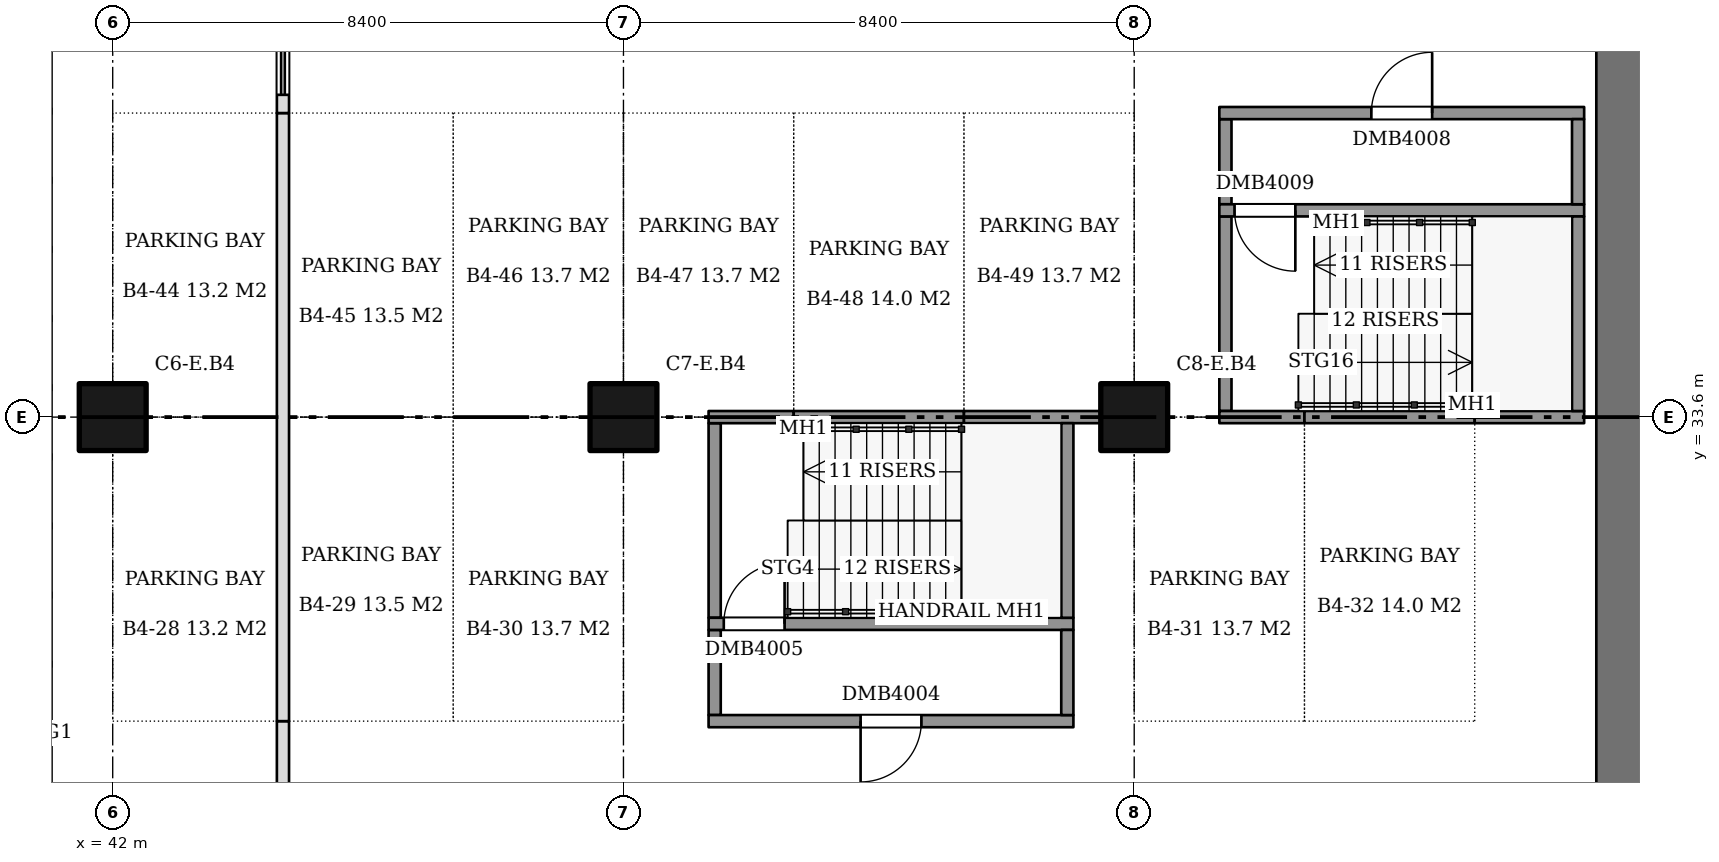
"""IFC4 building model, lengths in metres.
Left out: names, types, materials, properties, quantities, classifications, styles, units other than length and angle.
Written with IfcOpenShell. Run it as: python <this file> out.ifc"""

import sys

from ifc_helpers import new_model, si_unit, direction, frame, frame_2d, origin, origin_2d, place, context, subcontext, project, spatial, rectangle, extrude, element, fill, save


model = new_model("IFC4")
c1 = context("Model", 3, precision=1e-05, world=origin(), true_north=direction((0.0, 1.0)))
c2 = subcontext(c1, "Body", "Model", "MODEL_VIEW")
j1 = project(units=[si_unit("LENGTHUNIT", "METRE"), si_unit("PLANEANGLEUNIT", "RADIAN")], contexts=[c1])
p1 = place(None, origin())
s1 = spatial("IfcSite", under=j1, at=p1, CompositionType="ELEMENT")
p2 = place(p1, origin())
s2 = spatial("IfcBuilding", under=s1, at=p2, CompositionType="ELEMENT")
p3 = place(p2, frame((0.0, 0.0, -16.0)))
s3 = spatial("IfcBuildingStorey", under=s2, at=p3, CompositionType="ELEMENT", Elevation=-16.0)
p4 = place(p3, frame((66.8, 0.4, 0.0), z_axis=(0.0, 0.0, 1.0), x_axis=(0.0, 1.0, 0.0)))
e1 = element("IfcWall", 1, at=p4, inside=s3, PredefinedType="SOLIDWALL", context=c2, shape_type="SweptSolid", body=[
    extrude(rectangle(XDim=58.0, YDim=0.8, at=frame_2d((29.0, 0.0))), origin(), (0.0, 0.0, 1.0), 3.7),
])
for number, where, z_axis, x_axis in (
    (2, (42.0, 33.6, 0.0), (0.0, 0.0, 1.0), (1.0, 0.0, 0.0)),
    (3, (50.4, 33.6, 0.0), (0.0, 0.0, 1.0), (1.0, 0.0, 0.0)),
    (4, (58.8, 33.6, 0.0), (0.0, 0.0, 1.0), (1.0, 0.0, 0.0)),
):
    element("IfcColumn", number, at=place(p3, frame(where, z_axis=z_axis, x_axis=x_axis)), inside=s3, PredefinedType="COLUMN", context=c2, shape_type="SweptSolid", body=[
        extrude(rectangle(XDim=1.1, YDim=1.1, at=origin_2d()), origin(), (0.0, 0.0, 1.0), 3.7),
    ])
p5 = place(p3, frame((51.9, 28.7, 0.0), z_axis=(0.0, 0.0, 1.0), x_axis=(0.0, 1.0, 0.0)))
e5 = element("IfcWall", 5, at=p5, inside=s3, PredefinedType="SOLIDWALL", context=c2, shape_type="SweptSolid", body=[
    extrude(rectangle(XDim=1.4, YDim=0.2, at=frame_2d((0.7, 0.0))), origin(), (0.0, 0.0, 1.0), 3.7),
])
p6 = place(p3, frame((51.8, 28.6, 0.0), z_axis=(0.0, 0.0, 1.0), x_axis=(1.0, 0.0, 0.0)))
e6 = element("IfcWall", 6, at=p6, inside=s3, PredefinedType="SOLIDWALL", context=c2, shape_type="SweptSolid", body=[
    extrude(rectangle(XDim=6.0, YDim=0.2, at=frame_2d((3.0, 0.0))), origin(), (0.0, 0.0, 1.0), 3.7),
])
p7 = place(p6, frame((2.5, 0.0, 0.0)))
e7 = element("IfcOpeningElement", 7, at=p7, cuts=e6, PredefinedType="OPENING", context=c2, shape_type="SweptSolid", body=[
    extrude(rectangle(XDim=1.0, YDim=2.1, at=frame_2d((0.5, 1.05))), frame((0.0, 0.11, 0.0), z_axis=(0.0, -1.0, 0.0), x_axis=(1.0, 0.0, 0.0)), (0.0, 0.0, 1.0), 0.22),
])
p8 = place(p3, frame((51.9, 30.3, 0.0), z_axis=(0.0, 0.0, 1.0), x_axis=(0.0, 1.0, 0.0)))
e8 = element("IfcWall", 8, at=p8, inside=s3, PredefinedType="SOLIDWALL", context=c2, shape_type="SweptSolid", body=[
    extrude(rectangle(XDim=3.2, YDim=0.2, at=frame_2d((1.6, 0.0))), origin(), (0.0, 0.0, 1.0), 3.7),
])
p9 = place(p3, frame((51.8, 30.2, 0.0), z_axis=(0.0, 0.0, 1.0), x_axis=(1.0, 0.0, 0.0)))
e9 = element("IfcWall", 9, at=p9, inside=s3, PredefinedType="SOLIDWALL", context=c2, shape_type="SweptSolid", body=[
    extrude(rectangle(XDim=6.0, YDim=0.2, at=frame_2d((3.0, 0.0))), origin(), (0.0, 0.0, 1.0), 3.7),
])
p10 = place(p9, frame((0.25, 0.0, 0.0)))
e10 = element("IfcOpeningElement", 10, at=p10, cuts=e9, PredefinedType="OPENING", context=c2, shape_type="SweptSolid", body=[
    extrude(rectangle(XDim=1.0, YDim=2.1, at=frame_2d((0.5, 1.05))), frame((0.0, 0.11, 0.0), z_axis=(0.0, -1.0, 0.0), x_axis=(1.0, 0.0, 0.0)), (0.0, 0.0, 1.0), 0.22),
])
p11 = place(p3, frame((51.8, 33.6, 0.0), z_axis=(0.0, 0.0, 1.0), x_axis=(1.0, 0.0, 0.0)))
e11 = element("IfcWall", 11, at=p11, inside=s3, PredefinedType="SOLIDWALL", context=c2, shape_type="SweptSolid", body=[
    extrude(rectangle(XDim=1.4, YDim=0.2, at=frame_2d((0.7, 0.0))), origin(), (0.0, 0.0, 1.0), 3.7),
])
p12 = place(p3, frame((53.2, 33.6, 0.0), z_axis=(0.0, 0.0, 1.0), x_axis=(1.0, 0.0, 0.0)))
e12 = element("IfcWall", 12, at=p12, inside=s3, PredefinedType="SOLIDWALL", context=c2, shape_type="SweptSolid", body=[
    extrude(rectangle(XDim=2.8, YDim=0.2, at=frame_2d((1.4, 0.0))), origin(), (0.0, 0.0, 1.0), 3.7),
])
p13 = place(p3, frame((56.0, 33.6, 0.0), z_axis=(0.0, 0.0, 1.0), x_axis=(1.0, 0.0, 0.0)))
e13 = element("IfcWall", 13, at=p13, inside=s3, PredefinedType="SOLIDWALL", context=c2, shape_type="SweptSolid", body=[
    extrude(rectangle(XDim=2.25, YDim=0.2, at=frame_2d((1.125, 0.0))), origin(), (0.0, 0.0, 1.0), 3.7),
])
p14 = place(p3, frame((57.7, 28.7, 0.0), z_axis=(0.0, 0.0, 1.0), x_axis=(0.0, 1.0, 0.0)))
e14 = element("IfcWall", 14, at=p14, inside=s3, PredefinedType="SOLIDWALL", context=c2, shape_type="SweptSolid", body=[
    extrude(rectangle(XDim=1.4, YDim=0.2, at=frame_2d((0.7, 0.0))), origin(), (0.0, 0.0, 1.0), 3.7),
])
for number, where, z_axis, x_axis in (
    (15, (57.7, 30.3, 0.0), (0.0, 0.0, 1.0), (0.0, 1.0, 0.0)),
    (16, (60.3, 33.7, 0.0), (0.0, 0.0, 1.0), (0.0, 1.0, 0.0)),
):
    element("IfcWall", number, at=place(p3, frame(where, z_axis=z_axis, x_axis=x_axis)), inside=s3, PredefinedType="SOLIDWALL", context=c2, shape_type="SweptSolid", body=[
        extrude(rectangle(XDim=3.2, YDim=0.2, at=frame_2d((1.6, 0.0))), origin(), (0.0, 0.0, 1.0), 3.7),
    ])
p15 = place(p3, frame((60.2, 33.6, 0.0), z_axis=(0.0, 0.0, 1.0), x_axis=(1.0, 0.0, 0.0)))
e17 = element("IfcWall", 17, at=p15, inside=s3, PredefinedType="SOLIDWALL", context=c2, shape_type="SweptSolid", body=[
    extrude(rectangle(XDim=1.4, YDim=0.2, at=frame_2d((0.7, 0.0))), origin(), (0.0, 0.0, 1.0), 3.7),
])
p16 = place(p3, frame((60.3, 37.1, 0.0), z_axis=(0.0, 0.0, 1.0), x_axis=(0.0, 1.0, 0.0)))
e18 = element("IfcWall", 18, at=p16, inside=s3, PredefinedType="SOLIDWALL", context=c2, shape_type="SweptSolid", body=[
    extrude(rectangle(XDim=1.4, YDim=0.2, at=frame_2d((0.7, 0.0))), origin(), (0.0, 0.0, 1.0), 3.7),
])
p17 = place(p3, frame((60.2, 37.0, 0.0), z_axis=(0.0, 0.0, 1.0), x_axis=(1.0, 0.0, 0.0)))
e19 = element("IfcWall", 19, at=p17, inside=s3, PredefinedType="SOLIDWALL", context=c2, shape_type="SweptSolid", body=[
    extrude(rectangle(XDim=6.0, YDim=0.2, at=frame_2d((3.0, 0.0))), origin(), (0.0, 0.0, 1.0), 3.7),
])
p18 = place(p17, frame((0.25, 0.0, 0.0)))
e20 = element("IfcOpeningElement", 20, at=p18, cuts=e19, PredefinedType="OPENING", context=c2, shape_type="SweptSolid", body=[
    extrude(rectangle(XDim=1.0, YDim=2.1, at=frame_2d((0.5, 1.05))), frame((0.0, 0.11, 0.0), z_axis=(0.0, -1.0, 0.0), x_axis=(1.0, 0.0, 0.0)), (0.0, 0.0, 1.0), 0.22),
])
p19 = place(p3, frame((60.2, 38.6, 0.0), z_axis=(0.0, 0.0, 1.0), x_axis=(1.0, 0.0, 0.0)))
e21 = element("IfcWall", 21, at=p19, inside=s3, PredefinedType="SOLIDWALL", context=c2, shape_type="SweptSolid", body=[
    extrude(rectangle(XDim=6.0, YDim=0.2, at=frame_2d((3.0, 0.0))), origin(), (0.0, 0.0, 1.0), 3.7),
])
p20 = place(p19, frame((2.5, 0.0, 0.0)))
e22 = element("IfcOpeningElement", 22, at=p20, cuts=e21, PredefinedType="OPENING", context=c2, shape_type="SweptSolid", body=[
    extrude(rectangle(XDim=1.0, YDim=2.1, at=frame_2d((0.5, 1.05))), frame((0.0, 0.11, 0.0), z_axis=(0.0, -1.0, 0.0), x_axis=(1.0, 0.0, 0.0)), (0.0, 0.0, 1.0), 0.22),
])
p21 = place(p3, frame((61.6, 33.6, 0.0), z_axis=(0.0, 0.0, 1.0), x_axis=(1.0, 0.0, 0.0)))
e23 = element("IfcWall", 23, at=p21, inside=s3, PredefinedType="SOLIDWALL", context=c2, shape_type="SweptSolid", body=[
    extrude(rectangle(XDim=2.8, YDim=0.2, at=frame_2d((1.4, 0.0))), origin(), (0.0, 0.0, 1.0), 3.7),
])
p22 = place(p3, frame((64.4, 33.6, 0.0), z_axis=(0.0, 0.0, 1.0), x_axis=(1.0, 0.0, 0.0)))
e24 = element("IfcWall", 24, at=p22, inside=s3, PredefinedType="SOLIDWALL", context=c2, shape_type="SweptSolid", body=[
    extrude(rectangle(XDim=1.8, YDim=0.2, at=frame_2d((0.9, 0.0))), origin(), (0.0, 0.0, 1.0), 3.7),
])
p23 = place(p3, frame((66.1, 33.7, 0.0), z_axis=(0.0, 0.0, 1.0), x_axis=(0.0, 1.0, 0.0)))
e25 = element("IfcWall", 25, at=p23, inside=s3, PredefinedType="SOLIDWALL", context=c2, shape_type="SweptSolid", body=[
    extrude(rectangle(XDim=3.2, YDim=0.2, at=frame_2d((1.6, 0.0))), origin(), (0.0, 0.0, 1.0), 3.7),
])
p24 = place(p3, frame((66.1, 37.1, 0.0), z_axis=(0.0, 0.0, 1.0), x_axis=(0.0, 1.0, 0.0)))
e26 = element("IfcWall", 26, at=p24, inside=s3, PredefinedType="SOLIDWALL", context=c2, shape_type="SweptSolid", body=[
    extrude(rectangle(XDim=1.4, YDim=0.2, at=frame_2d((0.7, 0.0))), origin(), (0.0, 0.0, 1.0), 3.7),
])
p25 = place(p3, frame((44.8, 25.2, 0.0), z_axis=(0.0, 0.0, 1.0), x_axis=(0.0, 1.0, 0.0)))
e27 = element("IfcWall", 27, at=p25, inside=s3, PredefinedType="PARTITIONING", context=c2, shape_type="SweptSolid", body=[
    extrude(rectangle(XDim=3.4, YDim=0.2, at=frame_2d((1.7, 0.0))), origin(), (0.0, 0.0, 1.0), 3.7),
])
p26 = place(p3, frame((44.8, 28.6, 0.0), z_axis=(0.0, 0.0, 1.0), x_axis=(0.0, 1.0, 0.0)))
e28 = element("IfcWall", 28, at=p26, inside=s3, PredefinedType="PARTITIONING", context=c2, shape_type="SweptSolid", body=[
    extrude(rectangle(XDim=10.0, YDim=0.2, at=frame_2d((5.0, 0.0))), origin(), (0.0, 0.0, 1.0), 3.7),
])
p27 = place(p3, frame((44.8, 38.6, 0.0), z_axis=(0.0, 0.0, 1.0), x_axis=(0.0, 1.0, 0.0)))
e29 = element("IfcWall", 29, at=p27, inside=s3, PredefinedType="PARTITIONING", context=c2, shape_type="SweptSolid", body=[
    extrude(rectangle(XDim=6.8, YDim=0.2, at=frame_2d((3.4, 0.0))), origin(), (0.0, 0.0, 1.0), 3.7),
])
p28 = place(p27, frame((0.3, 0.0, 0.0)))
e30 = element("IfcOpeningElement", 30, at=p28, cuts=e29, PredefinedType="OPENING", context=c2, shape_type="SweptSolid", body=[
    extrude(rectangle(XDim=4.8, YDim=2.4, at=frame_2d((2.4, 1.2))), frame((0.0, 0.11, 0.0), z_axis=(0.0, -1.0, 0.0), x_axis=(1.0, 0.0, 0.0)), (0.0, 0.0, 1.0), 0.22),
])
p29 = place(p27, frame((5.4, 0.0, 0.0)))
e31 = element("IfcOpeningElement", 31, at=p29, cuts=e29, PredefinedType="OPENING", context=c2, shape_type="SweptSolid", body=[
    extrude(rectangle(XDim=1.0, YDim=2.1, at=frame_2d((0.5, 1.05))), frame((0.0, 0.11, 0.0), z_axis=(0.0, -1.0, 0.0), x_axis=(1.0, 0.0, 0.0)), (0.0, 0.0, 1.0), 0.22),
])
p30 = place(p7, frame((1.0, 0.0, 0.0), z_axis=(0.0, 0.0, 1.0), x_axis=(-1.0, 0.0, 0.0)))
e32 = element("IfcDoor", 32, at=p30, inside=s3, OperationType="SINGLE_SWING_RIGHT", PredefinedType="DOOR", context=c2, shape_type="SweptSolid", body=[
    extrude(rectangle(XDim=1.0, YDim=2.1, at=frame_2d((0.5, 1.05))), frame((0.0, 0.025, 0.0), z_axis=(0.0, -1.0, 0.0), x_axis=(1.0, 0.0, 0.0)), (0.0, 0.0, 1.0), 0.05),
])
fill(e7, e32)
p31 = place(p10, origin())
e33 = element("IfcDoor", 33, at=p31, inside=s3, OperationType="SINGLE_SWING_RIGHT", PredefinedType="DOOR", context=c2, shape_type="SweptSolid", body=[
    extrude(rectangle(XDim=1.0, YDim=2.1, at=frame_2d((0.5, 1.05))), frame((0.0, 0.025, 0.0), z_axis=(0.0, -1.0, 0.0), x_axis=(1.0, 0.0, 0.0)), (0.0, 0.0, 1.0), 0.05),
])
fill(e10, e33)
p32 = place(p20, origin())
e34 = element("IfcDoor", 34, at=p32, inside=s3, OperationType="SINGLE_SWING_RIGHT", PredefinedType="DOOR", context=c2, shape_type="SweptSolid", body=[
    extrude(rectangle(XDim=1.0, YDim=2.1, at=frame_2d((0.5, 1.05))), frame((0.0, 0.025, 0.0), z_axis=(0.0, -1.0, 0.0), x_axis=(1.0, 0.0, 0.0)), (0.0, 0.0, 1.0), 0.05),
])
fill(e22, e34)
p33 = place(p18, frame((1.0, 0.0, 0.0), z_axis=(0.0, 0.0, 1.0), x_axis=(-1.0, 0.0, 0.0)))
e35 = element("IfcDoor", 35, at=p33, inside=s3, OperationType="SINGLE_SWING_LEFT", PredefinedType="DOOR", context=c2, shape_type="SweptSolid", body=[
    extrude(rectangle(XDim=1.0, YDim=2.1, at=frame_2d((0.5, 1.05))), frame((0.0, 0.025, 0.0), z_axis=(0.0, -1.0, 0.0), x_axis=(1.0, 0.0, 0.0)), (0.0, 0.0, 1.0), 0.05),
])
fill(e20, e35)
p34 = place(p28, origin())
e36 = element("IfcDoor", 36, at=p34, inside=s3, OperationType="ROLLINGUP", PredefinedType="GATE", context=c2, shape_type="SweptSolid", body=[
    extrude(rectangle(XDim=4.8, YDim=2.4, at=frame_2d((2.4, 1.2))), frame((0.0, 0.025, 0.0), z_axis=(0.0, -1.0, 0.0), x_axis=(1.0, 0.0, 0.0)), (0.0, 0.0, 1.0), 0.05),
])
fill(e30, e36)
save(model, sys.argv[1])
